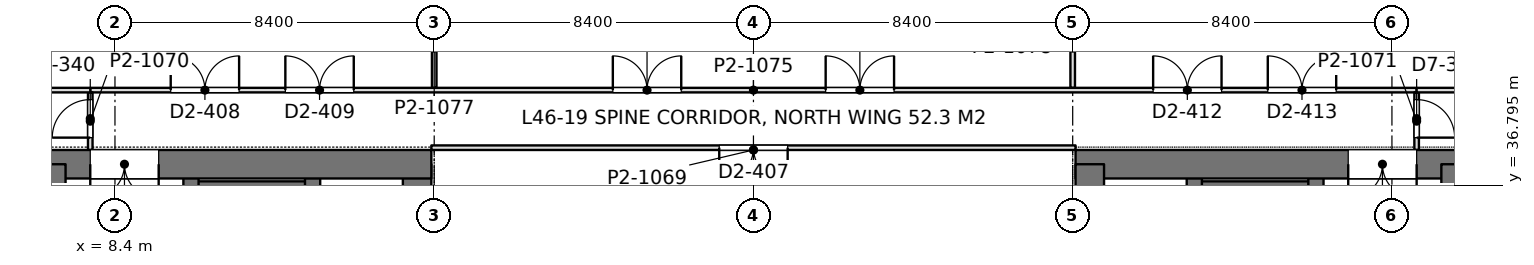
"""IFC4 building model, lengths in metres.
Left out: names, types, materials, properties, quantities, classifications, styles, units other than length and angle.
Written with IfcOpenShell. Run it as: python <this file> out.ifc"""

import sys

from ifc_helpers import new_model, si_unit, direction, frame, frame_2d, origin, place, context, subcontext, project, spatial, rectangle, extrude, element, fill, save


model = new_model("IFC4")
c1 = context("Model", 3, precision=1e-05, world=origin(), true_north=direction((0.0, 1.0)))
c2 = subcontext(c1, "Body", "Model", "MODEL_VIEW")
j1 = project(units=[si_unit("LENGTHUNIT", "METRE"), si_unit("PLANEANGLEUNIT", "RADIAN")], contexts=[c1])
p1 = place(None, origin())
s1 = spatial("IfcSite", under=j1, at=p1, CompositionType="ELEMENT")
p2 = place(p1, origin())
s2 = spatial("IfcBuilding", under=s1, at=p2, CompositionType="ELEMENT")
p3 = place(p2, frame((0.0, 0.0, 202.8)))
s3 = spatial("IfcBuildingStorey", under=s2, at=p3, CompositionType="ELEMENT", Elevation=202.8)
p4 = place(p3, frame((-1.125, 37.35, 0.0), z_axis=(0.0, 0.0, 1.0), x_axis=(1.0, 0.0, 0.0)))
e1 = element("IfcWall", 1, at=p4, inside=s3, PredefinedType="SHEAR", context=c2, shape_type="SweptSolid", body=[
    extrude(rectangle(XDim=17.85, YDim=0.75, at=frame_2d((8.925, 0.0))), origin(), (0.0, 0.0, 1.0), 4.2),
])
p5 = place(p4, frame((8.875, 0.0, 0.0)))
e2 = element("IfcOpeningElement", 2, at=p5, cuts=e1, PredefinedType="OPENING", context=c2, shape_type="SweptSolid", body=[
    extrude(rectangle(XDim=1.8, YDim=2.4, at=frame_2d((0.9, 1.2))), frame((0.0, 0.385, 0.0), z_axis=(0.0, -1.0, 0.0), x_axis=(1.0, 0.0, 0.0)), (0.0, 0.0, 1.0), 0.77),
])
p6 = place(p3, frame((16.35, 27.8, 0.0), z_axis=(0.0, 0.0, 1.0), x_axis=(0.0, 1.0, 0.0)))
e3 = element("IfcWall", 3, at=p6, inside=s3, PredefinedType="SHEAR", context=c2, shape_type="SweptSolid", body=[
    extrude(rectangle(XDim=9.55, YDim=0.75, at=frame_2d((4.775, 0.0))), origin(), (0.0, 0.0, 1.0), 4.2),
])
p7 = place(p3, frame((6.9, 13.05, 0.0), z_axis=(0.0, 0.0, 1.0), x_axis=(0.0, 1.0, 0.0)))
e4 = element("IfcWall", 4, at=p7, inside=s3, PredefinedType="SHEAR", context=c2, shape_type="SweptSolid", body=[
    extrude(rectangle(XDim=24.3, YDim=0.4, at=frame_2d((12.15, 0.0))), origin(), (0.0, 0.0, 1.0), 4.2),
])
p8 = place(p7, frame((1.3, 0.0, 0.0)))
e5 = element("IfcOpeningElement", 5, at=p8, cuts=e4, PredefinedType="OPENING", context=c2, shape_type="SweptSolid", body=[
    extrude(rectangle(XDim=1.0, YDim=2.2, at=frame_2d((0.5, 1.1))), frame((0.0, 0.21, 0.0), z_axis=(0.0, -1.0, 0.0), x_axis=(1.0, 0.0, 0.0)), (0.0, 0.0, 1.0), 0.42),
])
p9 = place(p7, frame((22.0, 0.0, 0.0)))
e6 = element("IfcOpeningElement", 6, at=p9, cuts=e4, PredefinedType="OPENING", context=c2, shape_type="SweptSolid", body=[
    extrude(rectangle(XDim=1.0, YDim=2.2, at=frame_2d((0.5, 1.1))), frame((0.0, 0.21, 0.0), z_axis=(0.0, -1.0, 0.0), x_axis=(1.0, 0.0, 0.0)), (0.0, 0.0, 1.0), 0.42),
])
p10 = place(p7, frame((5.55, 0.0, 0.0)))
e7 = element("IfcOpeningElement", 7, at=p10, cuts=e4, PredefinedType="OPENING", context=c2, shape_type="SweptSolid", body=[
    extrude(rectangle(XDim=1.0, YDim=2.2, at=frame_2d((0.5, 1.1))), frame((0.0, 0.21, 0.0), z_axis=(0.0, -1.0, 0.0), x_axis=(1.0, 0.0, 0.0)), (0.0, 0.0, 1.0), 0.42),
])
p11 = place(p7, frame((9.55, 0.0, 0.0)))
e8 = element("IfcOpeningElement", 8, at=p11, cuts=e4, PredefinedType="OPENING", context=c2, shape_type="SweptSolid", body=[
    extrude(rectangle(XDim=1.0, YDim=2.2, at=frame_2d((0.5, 1.1))), frame((0.0, 0.21, 0.0), z_axis=(0.0, -1.0, 0.0), x_axis=(1.0, 0.0, 0.0)), (0.0, 0.0, 1.0), 0.42),
])
p12 = place(p7, frame((12.8, 0.0, 0.0)))
e9 = element("IfcOpeningElement", 9, at=p12, cuts=e4, PredefinedType="OPENING", context=c2, shape_type="SweptSolid", body=[
    extrude(rectangle(XDim=1.1, YDim=2.2, at=frame_2d((0.55, 1.1))), frame((0.0, 0.21, 0.0), z_axis=(0.0, -1.0, 0.0), x_axis=(1.0, 0.0, 0.0)), (0.0, 0.0, 1.0), 0.42),
])
p13 = place(p7, frame((15.538, 0.0, 0.0)))
e10 = element("IfcOpeningElement", 10, at=p13, cuts=e4, PredefinedType="OPENING", context=c2, shape_type="SweptSolid", body=[
    extrude(rectangle(XDim=1.1, YDim=2.2, at=frame_2d((0.55, 1.1))), frame((0.0, 0.21, 0.0), z_axis=(0.0, -1.0, 0.0), x_axis=(1.0, 0.0, 0.0)), (0.0, 0.0, 1.0), 0.42),
])
p14 = place(p7, frame((18.262, 0.0, 0.0)))
e11 = element("IfcOpeningElement", 11, at=p14, cuts=e4, PredefinedType="OPENING", context=c2, shape_type="SweptSolid", body=[
    extrude(rectangle(XDim=1.1, YDim=2.2, at=frame_2d((0.55, 1.1))), frame((0.0, 0.21, 0.0), z_axis=(0.0, -1.0, 0.0), x_axis=(1.0, 0.0, 0.0)), (0.0, 0.0, 1.0), 0.42),
])
p15 = place(p3, frame((10.4, 13.05, 0.0), z_axis=(0.0, 0.0, 1.0), x_axis=(0.0, 1.0, 0.0)))
e12 = element("IfcWall", 12, at=p15, inside=s3, PredefinedType="SHEAR", context=c2, shape_type="SweptSolid", body=[
    extrude(rectangle(XDim=24.3, YDim=0.4, at=frame_2d((12.15, 0.0))), origin(), (0.0, 0.0, 1.0), 4.2),
])
p16 = place(p15, frame((15.75, 0.0, 0.0)))
e13 = element("IfcOpeningElement", 13, at=p16, cuts=e12, PredefinedType="OPENING", context=c2, shape_type="SweptSolid", body=[
    extrude(rectangle(XDim=1.1, YDim=2.2, at=frame_2d((0.55, 1.1))), frame((0.0, 0.21, 0.0), z_axis=(0.0, -1.0, 0.0), x_axis=(1.0, 0.0, 0.0)), (0.0, 0.0, 1.0), 0.42),
])
p17 = place(p15, frame((18.6, 0.0, 0.0)))
e14 = element("IfcOpeningElement", 14, at=p17, cuts=e12, PredefinedType="OPENING", context=c2, shape_type="SweptSolid", body=[
    extrude(rectangle(XDim=1.1, YDim=2.2, at=frame_2d((0.55, 1.1))), frame((0.0, 0.21, 0.0), z_axis=(0.0, -1.0, 0.0), x_axis=(1.0, 0.0, 0.0)), (0.0, 0.0, 1.0), 0.42),
])
p18 = place(p15, frame((21.45, 0.0, 0.0)))
e15 = element("IfcOpeningElement", 15, at=p18, cuts=e12, PredefinedType="OPENING", context=c2, shape_type="SweptSolid", body=[
    extrude(rectangle(XDim=1.1, YDim=2.2, at=frame_2d((0.55, 1.1))), frame((0.0, 0.21, 0.0), z_axis=(0.0, -1.0, 0.0), x_axis=(1.0, 0.0, 0.0)), (0.0, 0.0, 1.0), 0.42),
])
p19 = place(p15, frame((8.65, 0.0, 0.0)))
e16 = element("IfcOpeningElement", 16, at=p19, cuts=e12, PredefinedType="OPENING", context=c2, shape_type="SweptSolid", body=[
    extrude(rectangle(XDim=1.8, YDim=2.4, at=frame_2d((0.9, 1.2))), frame((0.0, 0.21, 0.0), z_axis=(0.0, -1.0, 0.0), x_axis=(1.0, 0.0, 0.0)), (0.0, 0.0, 1.0), 0.42),
])
p20 = place(p3, frame((13.6, 27.925, 0.0), z_axis=(0.0, 0.0, 1.0), x_axis=(0.0, 1.0, 0.0)))
e17 = element("IfcWall", 17, at=p20, inside=s3, PredefinedType="SHEAR", context=c2, shape_type="SweptSolid", body=[
    extrude(rectangle(XDim=9.425, YDim=0.4, at=frame_2d((4.712, 0.0))), origin(), (0.0, 0.0, 1.0), 4.2),
])
p21 = place(p3, frame((10.4, 36.625, 0.0), z_axis=(0.0, 0.0, 1.0), x_axis=(1.0, 0.0, 0.0)))
e18 = element("IfcWall", 18, at=p21, inside=s3, PredefinedType="SHEAR", context=c2, shape_type="SweptSolid", body=[
    extrude(rectangle(XDim=3.2, YDim=0.55, at=frame_2d((1.6, 0.0))), origin(), (0.0, 0.0, 1.0), 4.2),
])
p22 = place(p3, frame((33.675, 37.35, 0.0), z_axis=(0.0, 0.0, 1.0), x_axis=(1.0, 0.0, 0.0)))
e19 = element("IfcWall", 19, at=p22, inside=s3, PredefinedType="SHEAR", context=c2, shape_type="SweptSolid", body=[
    extrude(rectangle(XDim=17.85, YDim=0.75, at=frame_2d((8.925, 0.0))), origin(), (0.0, 0.0, 1.0), 4.2),
])
p23 = place(p22, frame((7.175, 0.0, 0.0)))
e20 = element("IfcOpeningElement", 20, at=p23, cuts=e19, PredefinedType="OPENING", context=c2, shape_type="SweptSolid", body=[
    extrude(rectangle(XDim=1.8, YDim=2.4, at=frame_2d((0.9, 1.2))), frame((0.0, 0.385, 0.0), z_axis=(0.0, -1.0, 0.0), x_axis=(1.0, 0.0, 0.0)), (0.0, 0.0, 1.0), 0.77),
])
p24 = place(p3, frame((34.05, 27.8, 0.0), z_axis=(0.0, 0.0, 1.0), x_axis=(0.0, 1.0, 0.0)))
e21 = element("IfcWall", 21, at=p24, inside=s3, PredefinedType="SHEAR", context=c2, shape_type="SweptSolid", body=[
    extrude(rectangle(XDim=9.55, YDim=0.75, at=frame_2d((4.775, 0.0))), origin(), (0.0, 0.0, 1.0), 4.2),
])
p25 = place(p3, frame((43.5, 13.05, 0.0), z_axis=(0.0, 0.0, 1.0), x_axis=(0.0, 1.0, 0.0)))
e22 = element("IfcWall", 22, at=p25, inside=s3, PredefinedType="SHEAR", context=c2, shape_type="SweptSolid", body=[
    extrude(rectangle(XDim=24.3, YDim=0.4, at=frame_2d((12.15, 0.0))), origin(), (0.0, 0.0, 1.0), 4.2),
])
p26 = place(p25, frame((1.3, 0.0, 0.0)))
e23 = element("IfcOpeningElement", 23, at=p26, cuts=e22, PredefinedType="OPENING", context=c2, shape_type="SweptSolid", body=[
    extrude(rectangle(XDim=1.0, YDim=2.2, at=frame_2d((0.5, 1.1))), frame((0.0, 0.21, 0.0), z_axis=(0.0, -1.0, 0.0), x_axis=(1.0, 0.0, 0.0)), (0.0, 0.0, 1.0), 0.42),
])
p27 = place(p25, frame((22.0, 0.0, 0.0)))
e24 = element("IfcOpeningElement", 24, at=p27, cuts=e22, PredefinedType="OPENING", context=c2, shape_type="SweptSolid", body=[
    extrude(rectangle(XDim=1.0, YDim=2.2, at=frame_2d((0.5, 1.1))), frame((0.0, 0.21, 0.0), z_axis=(0.0, -1.0, 0.0), x_axis=(1.0, 0.0, 0.0)), (0.0, 0.0, 1.0), 0.42),
])
p28 = place(p25, frame((5.55, 0.0, 0.0)))
e25 = element("IfcOpeningElement", 25, at=p28, cuts=e22, PredefinedType="OPENING", context=c2, shape_type="SweptSolid", body=[
    extrude(rectangle(XDim=1.0, YDim=2.2, at=frame_2d((0.5, 1.1))), frame((0.0, 0.21, 0.0), z_axis=(0.0, -1.0, 0.0), x_axis=(1.0, 0.0, 0.0)), (0.0, 0.0, 1.0), 0.42),
])
p29 = place(p25, frame((9.55, 0.0, 0.0)))
e26 = element("IfcOpeningElement", 26, at=p29, cuts=e22, PredefinedType="OPENING", context=c2, shape_type="SweptSolid", body=[
    extrude(rectangle(XDim=1.0, YDim=2.2, at=frame_2d((0.5, 1.1))), frame((0.0, 0.21, 0.0), z_axis=(0.0, -1.0, 0.0), x_axis=(1.0, 0.0, 0.0)), (0.0, 0.0, 1.0), 0.42),
])
p30 = place(p25, frame((12.8, 0.0, 0.0)))
e27 = element("IfcOpeningElement", 27, at=p30, cuts=e22, PredefinedType="OPENING", context=c2, shape_type="SweptSolid", body=[
    extrude(rectangle(XDim=1.1, YDim=2.2, at=frame_2d((0.55, 1.1))), frame((0.0, 0.21, 0.0), z_axis=(0.0, -1.0, 0.0), x_axis=(1.0, 0.0, 0.0)), (0.0, 0.0, 1.0), 0.42),
])
p31 = place(p25, frame((15.538, 0.0, 0.0)))
e28 = element("IfcOpeningElement", 28, at=p31, cuts=e22, PredefinedType="OPENING", context=c2, shape_type="SweptSolid", body=[
    extrude(rectangle(XDim=1.1, YDim=2.2, at=frame_2d((0.55, 1.1))), frame((0.0, 0.21, 0.0), z_axis=(0.0, -1.0, 0.0), x_axis=(1.0, 0.0, 0.0)), (0.0, 0.0, 1.0), 0.42),
])
p32 = place(p25, frame((18.262, 0.0, 0.0)))
e29 = element("IfcOpeningElement", 29, at=p32, cuts=e22, PredefinedType="OPENING", context=c2, shape_type="SweptSolid", body=[
    extrude(rectangle(XDim=1.1, YDim=2.2, at=frame_2d((0.55, 1.1))), frame((0.0, 0.21, 0.0), z_axis=(0.0, -1.0, 0.0), x_axis=(1.0, 0.0, 0.0)), (0.0, 0.0, 1.0), 0.42),
])
p33 = place(p3, frame((40.0, 13.05, 0.0), z_axis=(0.0, 0.0, 1.0), x_axis=(0.0, 1.0, 0.0)))
e30 = element("IfcWall", 30, at=p33, inside=s3, PredefinedType="SHEAR", context=c2, shape_type="SweptSolid", body=[
    extrude(rectangle(XDim=24.3, YDim=0.4, at=frame_2d((12.15, 0.0))), origin(), (0.0, 0.0, 1.0), 4.2),
])
p34 = place(p33, frame((15.75, 0.0, 0.0)))
e31 = element("IfcOpeningElement", 31, at=p34, cuts=e30, PredefinedType="OPENING", context=c2, shape_type="SweptSolid", body=[
    extrude(rectangle(XDim=1.1, YDim=2.2, at=frame_2d((0.55, 1.1))), frame((0.0, 0.21, 0.0), z_axis=(0.0, -1.0, 0.0), x_axis=(1.0, 0.0, 0.0)), (0.0, 0.0, 1.0), 0.42),
])
p35 = place(p33, frame((18.6, 0.0, 0.0)))
e32 = element("IfcOpeningElement", 32, at=p35, cuts=e30, PredefinedType="OPENING", context=c2, shape_type="SweptSolid", body=[
    extrude(rectangle(XDim=1.1, YDim=2.2, at=frame_2d((0.55, 1.1))), frame((0.0, 0.21, 0.0), z_axis=(0.0, -1.0, 0.0), x_axis=(1.0, 0.0, 0.0)), (0.0, 0.0, 1.0), 0.42),
])
p36 = place(p33, frame((21.45, 0.0, 0.0)))
e33 = element("IfcOpeningElement", 33, at=p36, cuts=e30, PredefinedType="OPENING", context=c2, shape_type="SweptSolid", body=[
    extrude(rectangle(XDim=1.1, YDim=2.2, at=frame_2d((0.55, 1.1))), frame((0.0, 0.21, 0.0), z_axis=(0.0, -1.0, 0.0), x_axis=(1.0, 0.0, 0.0)), (0.0, 0.0, 1.0), 0.42),
])
p37 = place(p33, frame((8.65, 0.0, 0.0)))
e34 = element("IfcOpeningElement", 34, at=p37, cuts=e30, PredefinedType="OPENING", context=c2, shape_type="SweptSolid", body=[
    extrude(rectangle(XDim=1.8, YDim=2.4, at=frame_2d((0.9, 1.2))), frame((0.0, 0.21, 0.0), z_axis=(0.0, -1.0, 0.0), x_axis=(1.0, 0.0, 0.0)), (0.0, 0.0, 1.0), 0.42),
])
p38 = place(p3, frame((36.8, 27.925, 0.0), z_axis=(0.0, 0.0, 1.0), x_axis=(0.0, 1.0, 0.0)))
e35 = element("IfcWall", 35, at=p38, inside=s3, PredefinedType="SHEAR", context=c2, shape_type="SweptSolid", body=[
    extrude(rectangle(XDim=9.425, YDim=0.4, at=frame_2d((4.712, 0.0))), origin(), (0.0, 0.0, 1.0), 4.2),
])
p39 = place(p3, frame((40.0, 36.625, 0.0), z_axis=(0.0, 0.0, 1.0), x_axis=(-1.0, 0.0, 0.0)))
e36 = element("IfcWall", 36, at=p39, inside=s3, PredefinedType="SHEAR", context=c2, shape_type="SweptSolid", body=[
    extrude(rectangle(XDim=3.2, YDim=0.55, at=frame_2d((1.6, 0.0))), origin(), (0.0, 0.0, 1.0), 4.2),
])
for number, where, z_axis, x_axis in (
    (37, (16.8, 39.358, 0.0), (0.0, 0.0, 1.0), (0.0, 1.0, 0.0)),
    (38, (33.6, 39.358, 0.0), (0.0, 0.0, 1.0), (0.0, 1.0, 0.0)),
):
    element("IfcWall", number, at=place(p3, frame(where, z_axis=z_axis, x_axis=x_axis)), inside=s3, PredefinedType="PARTITIONING", context=c2, shape_type="SweptSolid", body=[
        extrude(rectangle(XDim=2.093, YDim=0.12, at=frame_2d((1.046, 0.0))), origin(), (0.0, 0.0, 1.0), 3.69),
    ])
p40 = place(p3, frame((7.748, 39.3, 0.0), z_axis=(0.0, 0.0, 1.0), x_axis=(1.0, 0.0, 0.0)))
e39 = element("IfcWall", 39, at=p40, inside=s3, PredefinedType="PARTITIONING", context=c2, shape_type="SweptSolid", body=[
    extrude(rectangle(XDim=34.904, YDim=0.12, at=frame_2d((17.452, 0.0))), origin(), (0.0, 0.0, 1.0), 3.55),
])
p41 = place(p40, frame((2.119, 0.0, 0.0)))
e40 = element("IfcOpeningElement", 40, at=p41, cuts=e39, PredefinedType="OPENING", context=c2, shape_type="SweptSolid", body=[
    extrude(rectangle(XDim=1.8, YDim=2.2, at=frame_2d((0.9, 1.1))), frame((0.0, 0.07, 0.0), z_axis=(0.0, -1.0, 0.0), x_axis=(1.0, 0.0, 0.0)), (0.0, 0.0, 1.0), 0.14),
])
p42 = place(p40, frame((5.135, 0.0, 0.0)))
e41 = element("IfcOpeningElement", 41, at=p42, cuts=e39, PredefinedType="OPENING", context=c2, shape_type="SweptSolid", body=[
    extrude(rectangle(XDim=1.8, YDim=2.2, at=frame_2d((0.9, 1.1))), frame((0.0, 0.07, 0.0), z_axis=(0.0, -1.0, 0.0), x_axis=(1.0, 0.0, 0.0)), (0.0, 0.0, 1.0), 0.14),
])
p43 = place(p40, frame((13.752, 0.0, 0.0)))
e42 = element("IfcOpeningElement", 42, at=p43, cuts=e39, PredefinedType="OPENING", context=c2, shape_type="SweptSolid", body=[
    extrude(rectangle(XDim=1.8, YDim=2.2, at=frame_2d((0.9, 1.1))), frame((0.0, 0.07, 0.0), z_axis=(0.0, -1.0, 0.0), x_axis=(1.0, 0.0, 0.0)), (0.0, 0.0, 1.0), 0.14),
])
p44 = place(p40, frame((19.352, 0.0, 0.0)))
e43 = element("IfcOpeningElement", 43, at=p44, cuts=e39, PredefinedType="OPENING", context=c2, shape_type="SweptSolid", body=[
    extrude(rectangle(XDim=1.8, YDim=2.2, at=frame_2d((0.9, 1.1))), frame((0.0, 0.07, 0.0), z_axis=(0.0, -1.0, 0.0), x_axis=(1.0, 0.0, 0.0)), (0.0, 0.0, 1.0), 0.14),
])
p45 = place(p40, frame((27.969, 0.0, 0.0)))
e44 = element("IfcOpeningElement", 44, at=p45, cuts=e39, PredefinedType="OPENING", context=c2, shape_type="SweptSolid", body=[
    extrude(rectangle(XDim=1.8, YDim=2.2, at=frame_2d((0.9, 1.1))), frame((0.0, 0.07, 0.0), z_axis=(0.0, -1.0, 0.0), x_axis=(1.0, 0.0, 0.0)), (0.0, 0.0, 1.0), 0.14),
])
p46 = place(p40, frame((30.985, 0.0, 0.0)))
e45 = element("IfcOpeningElement", 45, at=p46, cuts=e39, PredefinedType="OPENING", context=c2, shape_type="SweptSolid", body=[
    extrude(rectangle(XDim=1.8, YDim=2.2, at=frame_2d((0.9, 1.1))), frame((0.0, 0.07, 0.0), z_axis=(0.0, -1.0, 0.0), x_axis=(1.0, 0.0, 0.0)), (0.0, 0.0, 1.0), 0.14),
])
p47 = place(p3, frame((7.75, 37.724, 0.0), z_axis=(0.0, 0.0, 1.0), x_axis=(0.0, 1.0, 0.0)))
e46 = element("IfcWall", 46, at=p47, inside=s3, PredefinedType="PARTITIONING", context=c2, shape_type="SweptSolid", body=[
    extrude(rectangle(XDim=1.518, YDim=0.12, at=frame_2d((0.759, 0.0))), origin(), (0.0, 0.0, 1.0), 4.05),
])
p48 = place(p47, frame((0.326, 0.0, 0.0)))
e47 = element("IfcOpeningElement", 47, at=p48, cuts=e46, PredefinedType="OPENING", context=c2, shape_type="SweptSolid", body=[
    extrude(rectangle(XDim=1.0, YDim=2.4, at=frame_2d((0.5, 1.2))), frame((0.0, 0.07, 0.0), z_axis=(0.0, -1.0, 0.0), x_axis=(1.0, 0.0, 0.0)), (0.0, 0.0, 1.0), 0.14),
])
p49 = place(p3, frame((42.65, 37.724, 0.0), z_axis=(0.0, 0.0, 1.0), x_axis=(0.0, 1.0, 0.0)))
e48 = element("IfcWall", 48, at=p49, inside=s3, PredefinedType="PARTITIONING", context=c2, shape_type="SweptSolid", body=[
    extrude(rectangle(XDim=1.518, YDim=0.12, at=frame_2d((0.759, 0.0))), origin(), (0.0, 0.0, 1.0), 4.05),
])
p50 = place(p49, frame((0.326, 0.0, 0.0)))
e49 = element("IfcOpeningElement", 49, at=p50, cuts=e48, PredefinedType="OPENING", context=c2, shape_type="SweptSolid", body=[
    extrude(rectangle(XDim=1.0, YDim=2.4, at=frame_2d((0.5, 1.2))), frame((0.0, 0.07, 0.0), z_axis=(0.0, -1.0, 0.0), x_axis=(1.0, 0.0, 0.0)), (0.0, 0.0, 1.0), 0.14),
])
for number, where, z_axis, x_axis in (
    (50, (1.2, 39.3, 0.0), (0.0, 0.0, 1.0), (1.0, 0.0, 0.0)),
    (51, (42.648, 39.3, 0.0), (0.0, 0.0, 1.0), (1.0, 0.0, 0.0)),
):
    element("IfcWall", number, at=place(p3, frame(where, z_axis=z_axis, x_axis=x_axis)), inside=s3, PredefinedType="PARTITIONING", context=c2, shape_type="SweptSolid", body=[
        extrude(rectangle(XDim=6.552, YDim=0.12, at=frame_2d((3.276, 0.0))), origin(), (0.0, 0.0, 1.0), 3.69),
    ])
p51 = place(p3, frame((16.725, 37.785, 0.0), z_axis=(0.0, 0.0, 1.0), x_axis=(1.0, 0.0, 0.0)))
e52 = element("IfcWall", 52, at=p51, inside=s3, PredefinedType="PARTITIONING", context=c2, shape_type="SweptSolid", body=[
    extrude(rectangle(XDim=16.95, YDim=0.12, at=frame_2d((8.475, 0.0))), origin(), (0.0, 0.0, 1.0), 3.55),
])
p52 = place(p51, frame((7.575, 0.0, 0.0)))
e53 = element("IfcOpeningElement", 53, at=p52, cuts=e52, PredefinedType="OPENING", context=c2, shape_type="SweptSolid", body=[
    extrude(rectangle(XDim=1.8, YDim=2.2, at=frame_2d((0.9, 1.1))), frame((0.0, 0.07, 0.0), z_axis=(0.0, -1.0, 0.0), x_axis=(1.0, 0.0, 0.0)), (0.0, 0.0, 1.0), 0.14),
])
p53 = place(p5, frame((1.8, 0.0, 0.0), z_axis=(0.0, 0.0, 1.0), x_axis=(-1.0, 0.0, 0.0)))
e54 = element("IfcDoor", 54, at=p53, inside=s3, OperationType="DOUBLE_DOOR_SINGLE_SWING", PredefinedType="DOOR", context=c2, shape_type="SweptSolid", body=[
    extrude(rectangle(XDim=1.8, YDim=2.4, at=frame_2d((0.9, 1.2))), frame((0.0, 0.025, 0.0), z_axis=(0.0, -1.0, 0.0), x_axis=(1.0, 0.0, 0.0)), (0.0, 0.0, 1.0), 0.05),
])
fill(e2, e54)
p54 = place(p23, frame((1.8, 0.0, 0.0), z_axis=(0.0, 0.0, 1.0), x_axis=(-1.0, 0.0, 0.0)))
e55 = element("IfcDoor", 55, at=p54, inside=s3, OperationType="DOUBLE_DOOR_SINGLE_SWING", PredefinedType="DOOR", context=c2, shape_type="SweptSolid", body=[
    extrude(rectangle(XDim=1.8, YDim=2.4, at=frame_2d((0.9, 1.2))), frame((0.0, 0.025, 0.0), z_axis=(0.0, -1.0, 0.0), x_axis=(1.0, 0.0, 0.0)), (0.0, 0.0, 1.0), 0.05),
])
fill(e20, e55)
p55 = place(p41, origin())
e56 = element("IfcDoor", 56, at=p55, inside=s3, OperationType="DOUBLE_DOOR_SINGLE_SWING", PredefinedType="DOOR", context=c2, shape_type="SweptSolid", body=[
    extrude(rectangle(XDim=1.8, YDim=2.2, at=frame_2d((0.9, 1.1))), frame((0.0, 0.025, 0.0), z_axis=(0.0, -1.0, 0.0), x_axis=(1.0, 0.0, 0.0)), (0.0, 0.0, 1.0), 0.05),
])
fill(e40, e56)
p56 = place(p42, origin())
e57 = element("IfcDoor", 57, at=p56, inside=s3, OperationType="DOUBLE_DOOR_SINGLE_SWING", PredefinedType="DOOR", context=c2, shape_type="SweptSolid", body=[
    extrude(rectangle(XDim=1.8, YDim=2.2, at=frame_2d((0.9, 1.1))), frame((0.0, 0.025, 0.0), z_axis=(0.0, -1.0, 0.0), x_axis=(1.0, 0.0, 0.0)), (0.0, 0.0, 1.0), 0.05),
])
fill(e41, e57)
p57 = place(p43, origin())
e58 = element("IfcDoor", 58, at=p57, inside=s3, OperationType="DOUBLE_DOOR_SINGLE_SWING", PredefinedType="DOOR", context=c2, shape_type="SweptSolid", body=[
    extrude(rectangle(XDim=1.8, YDim=2.2, at=frame_2d((0.9, 1.1))), frame((0.0, 0.025, 0.0), z_axis=(0.0, -1.0, 0.0), x_axis=(1.0, 0.0, 0.0)), (0.0, 0.0, 1.0), 0.05),
])
fill(e42, e58)
p58 = place(p44, origin())
e59 = element("IfcDoor", 59, at=p58, inside=s3, OperationType="DOUBLE_DOOR_SINGLE_SWING", PredefinedType="DOOR", context=c2, shape_type="SweptSolid", body=[
    extrude(rectangle(XDim=1.8, YDim=2.2, at=frame_2d((0.9, 1.1))), frame((0.0, 0.025, 0.0), z_axis=(0.0, -1.0, 0.0), x_axis=(1.0, 0.0, 0.0)), (0.0, 0.0, 1.0), 0.05),
])
fill(e43, e59)
p59 = place(p45, origin())
e60 = element("IfcDoor", 60, at=p59, inside=s3, OperationType="DOUBLE_DOOR_SINGLE_SWING", PredefinedType="DOOR", context=c2, shape_type="SweptSolid", body=[
    extrude(rectangle(XDim=1.8, YDim=2.2, at=frame_2d((0.9, 1.1))), frame((0.0, 0.025, 0.0), z_axis=(0.0, -1.0, 0.0), x_axis=(1.0, 0.0, 0.0)), (0.0, 0.0, 1.0), 0.05),
])
fill(e44, e60)
p60 = place(p46, origin())
e61 = element("IfcDoor", 61, at=p60, inside=s3, OperationType="DOUBLE_DOOR_SINGLE_SWING", PredefinedType="DOOR", context=c2, shape_type="SweptSolid", body=[
    extrude(rectangle(XDim=1.8, YDim=2.2, at=frame_2d((0.9, 1.1))), frame((0.0, 0.025, 0.0), z_axis=(0.0, -1.0, 0.0), x_axis=(1.0, 0.0, 0.0)), (0.0, 0.0, 1.0), 0.05),
])
fill(e45, e61)
p61 = place(p48, origin())
e62 = element("IfcDoor", 62, at=p61, inside=s3, OperationType="SINGLE_SWING_LEFT", PredefinedType="DOOR", context=c2, shape_type="SweptSolid", body=[
    extrude(rectangle(XDim=1.0, YDim=2.4, at=frame_2d((0.5, 1.2))), frame((0.0, 0.025, 0.0), z_axis=(0.0, -1.0, 0.0), x_axis=(1.0, 0.0, 0.0)), (0.0, 0.0, 1.0), 0.05),
])
fill(e47, e62)
p62 = place(p50, frame((1.0, 0.0, 0.0), z_axis=(0.0, 0.0, 1.0), x_axis=(-1.0, 0.0, 0.0)))
e63 = element("IfcDoor", 63, at=p62, inside=s3, OperationType="SINGLE_SWING_RIGHT", PredefinedType="DOOR", context=c2, shape_type="SweptSolid", body=[
    extrude(rectangle(XDim=1.0, YDim=2.4, at=frame_2d((0.5, 1.2))), frame((0.0, 0.025, 0.0), z_axis=(0.0, -1.0, 0.0), x_axis=(1.0, 0.0, 0.0)), (0.0, 0.0, 1.0), 0.05),
])
fill(e49, e63)
p63 = place(p52, frame((1.8, 0.0, 0.0), z_axis=(0.0, 0.0, 1.0), x_axis=(-1.0, 0.0, 0.0)))
e64 = element("IfcDoor", 64, at=p63, inside=s3, OperationType="DOUBLE_DOOR_SINGLE_SWING", PredefinedType="DOOR", context=c2, shape_type="SweptSolid", body=[
    extrude(rectangle(XDim=1.8, YDim=2.2, at=frame_2d((0.9, 1.1))), frame((0.0, 0.025, 0.0), z_axis=(0.0, -1.0, 0.0), x_axis=(1.0, 0.0, 0.0)), (0.0, 0.0, 1.0), 0.05),
])
fill(e53, e64)
save(model, sys.argv[1])
